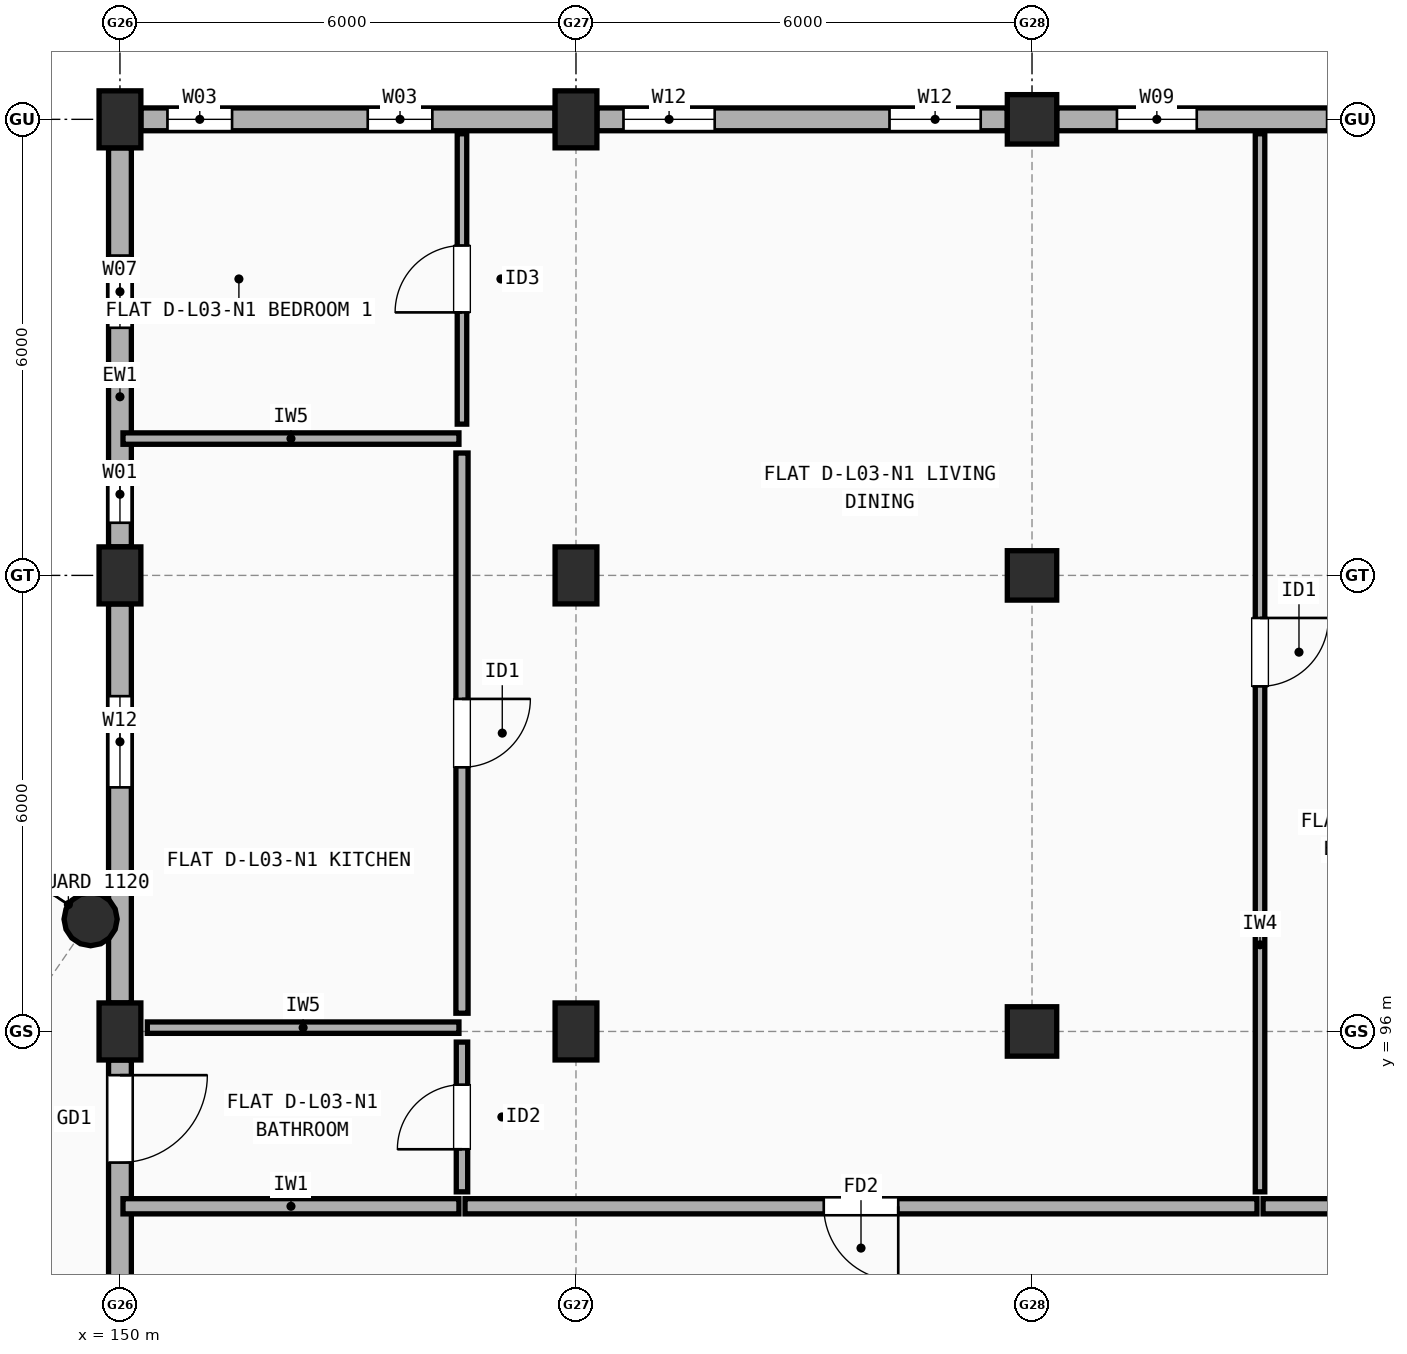
"""IFC4 building model, lengths in metres.
Left out: names, types, materials, properties, quantities, classifications, styles, units other than length and angle.
Written with IfcOpenShell. Run it as: python <this file> out.ifc"""

import sys

from ifc_helpers import new_model, si_unit, direction, frame, frame_2d, origin, origin_2d, place, context, subcontext, project, spatial, rectangle, circle, extrude, element, fill, save


model = new_model("IFC4")
c1 = context("Model", 3, precision=1e-05, world=origin(), true_north=direction((0.0, 1.0)))
c2 = subcontext(c1, "Body", "Model", "MODEL_VIEW")
j1 = project(units=[si_unit("LENGTHUNIT", "METRE"), si_unit("PLANEANGLEUNIT", "RADIAN")], contexts=[c1])
p1 = place(None, origin())
s1 = spatial("IfcSite", under=j1, at=p1, CompositionType="ELEMENT")
p2 = place(p1, origin())
s2 = spatial("IfcBuilding", under=s1, at=p2, CompositionType="ELEMENT")
p3 = place(p2, frame((0.0, 0.0, 10.9)))
s3 = spatial("IfcBuildingStorey", under=s2, at=p3, CompositionType="ELEMENT", Elevation=10.9)
for number, where, z_axis, x_axis in (
    (1, (150.0, 96.0, 0.0), (0.0, 0.0, 1.0), (1.0, 0.0, 0.0)),
    (2, (150.0, 102.0, 0.0), (0.0, 0.0, 1.0), (1.0, 0.0, 0.0)),
    (3, (150.0, 108.0, 0.0), (0.0, 0.0, 1.0), (1.0, 0.0, 0.0)),
    (4, (156.0, 96.0, 0.0), (0.0, 0.0, 1.0), (1.0, 0.0, 0.0)),
    (5, (156.0, 102.0, 0.0), (0.0, 0.0, 1.0), (1.0, 0.0, 0.0)),
    (6, (156.0, 108.0, 0.0), (0.0, 0.0, 1.0), (1.0, 0.0, 0.0)),
):
    element("IfcColumn", number, at=place(p3, frame(where, z_axis=z_axis, x_axis=x_axis)), inside=s3, PredefinedType="COLUMN", context=c2, shape_type="SweptSolid", body=[
        extrude(rectangle(XDim=0.55, YDim=0.75, at=origin_2d()), origin(), (0.0, 0.0, 1.0), 2.96),
    ])
for number, where, z_axis, x_axis in (
    (7, (162.0, 96.0, 0.0), (0.0, 0.0, 1.0), (1.0, 0.0, 0.0)),
    (8, (162.0, 102.0, 0.0), (0.0, 0.0, 1.0), (1.0, 0.0, 0.0)),
    (9, (162.0, 108.0, 0.0), (0.0, 0.0, 1.0), (1.0, 0.0, 0.0)),
):
    element("IfcColumn", number, at=place(p3, frame(where, z_axis=z_axis, x_axis=x_axis)), inside=s3, PredefinedType="COLUMN", context=c2, shape_type="SweptSolid", body=[
        extrude(rectangle(XDim=0.65, YDim=0.65, at=origin_2d()), origin(), (0.0, 0.0, 1.0), 2.96),
    ])
p4 = place(p3, frame((149.614, 97.477, 0.0), z_axis=(0.0, 0.0, 1.0), x_axis=(1.0, 0.0, 0.0)))
e10 = element("IfcColumn", 10, at=p4, inside=s3, PredefinedType="COLUMN", context=c2, shape_type="SweptSolid", body=[
    extrude(circle(Radius=0.35, at=origin_2d()), origin(), (0.0, 0.0, 1.0), 2.948),
])
p5 = place(p3, frame((167.675, 108.0, 0.0), z_axis=(0.0, 0.0, 1.0), x_axis=(-1.0, 0.0, 0.0)))
e11 = element("IfcWall", 11, at=p5, inside=s3, PredefinedType="STANDARD", context=c2, shape_type="SweptSolid", body=[
    extrude(rectangle(XDim=5.35, YDim=0.3, at=frame_2d((2.675, 0.0))), origin(), (0.0, 0.0, 1.0), 2.442),
])
p6 = place(p5, frame((0.843, 0.0, 0.9)))
e12 = element("IfcOpeningElement", 12, at=p6, cuts=e11, PredefinedType="OPENING", context=c2, shape_type="SweptSolid", body=[
    extrude(rectangle(XDim=0.95, YDim=1.35, at=frame_2d((0.475, 0.675))), frame((0.0, 0.16, 0.0), z_axis=(0.0, -1.0, 0.0), x_axis=(1.0, 0.0, 0.0)), (0.0, 0.0, 1.0), 0.32),
])
p7 = place(p5, frame((3.508, 0.0, 0.9)))
e13 = element("IfcOpeningElement", 13, at=p7, cuts=e11, PredefinedType="OPENING", context=c2, shape_type="SweptSolid", body=[
    extrude(rectangle(XDim=1.05, YDim=1.35, at=frame_2d((0.525, 0.675))), frame((0.0, 0.16, 0.0), z_axis=(0.0, -1.0, 0.0), x_axis=(1.0, 0.0, 0.0)), (0.0, 0.0, 1.0), 0.32),
])
p8 = place(p3, frame((161.675, 108.0, 0.0), z_axis=(0.0, 0.0, 1.0), x_axis=(-1.0, 0.0, 0.0)))
e14 = element("IfcWall", 14, at=p8, inside=s3, PredefinedType="STANDARD", context=c2, shape_type="SweptSolid", body=[
    extrude(rectangle(XDim=5.4, YDim=0.3, at=frame_2d((2.7, 0.0))), origin(), (0.0, 0.0, 1.0), 2.442),
])
p9 = place(p8, frame((0.35, 0.0, 0.9)))
e15 = element("IfcOpeningElement", 15, at=p9, cuts=e14, PredefinedType="OPENING", context=c2, shape_type="SweptSolid", body=[
    extrude(rectangle(XDim=1.2, YDim=1.35, at=frame_2d((0.6, 0.675))), frame((0.0, 0.16, 0.0), z_axis=(0.0, -1.0, 0.0), x_axis=(1.0, 0.0, 0.0)), (0.0, 0.0, 1.0), 0.32),
])
p10 = place(p8, frame((3.85, 0.0, 0.9)))
e16 = element("IfcOpeningElement", 16, at=p10, cuts=e14, PredefinedType="OPENING", context=c2, shape_type="SweptSolid", body=[
    extrude(rectangle(XDim=1.2, YDim=1.35, at=frame_2d((0.6, 0.675))), frame((0.0, 0.16, 0.0), z_axis=(0.0, -1.0, 0.0), x_axis=(1.0, 0.0, 0.0)), (0.0, 0.0, 1.0), 0.32),
])
p11 = place(p3, frame((155.725, 108.0, 0.0), z_axis=(0.0, 0.0, 1.0), x_axis=(-1.0, 0.0, 0.0)))
e17 = element("IfcWall", 17, at=p11, inside=s3, PredefinedType="STANDARD", context=c2, shape_type="SweptSolid", body=[
    extrude(rectangle(XDim=5.45, YDim=0.3, at=frame_2d((2.725, 0.0))), origin(), (0.0, 0.0, 1.0), 2.442),
])
p12 = place(p11, frame((1.615, 0.0, 0.9)))
e18 = element("IfcOpeningElement", 18, at=p12, cuts=e17, PredefinedType="OPENING", context=c2, shape_type="SweptSolid", body=[
    extrude(rectangle(XDim=0.85, YDim=1.25, at=frame_2d((0.425, 0.625))), frame((0.0, 0.16, 0.0), z_axis=(0.0, -1.0, 0.0), x_axis=(1.0, 0.0, 0.0)), (0.0, 0.0, 1.0), 0.32),
])
p13 = place(p11, frame((4.25, 0.0, 0.9)))
e19 = element("IfcOpeningElement", 19, at=p13, cuts=e17, PredefinedType="OPENING", context=c2, shape_type="SweptSolid", body=[
    extrude(rectangle(XDim=0.85, YDim=1.25, at=frame_2d((0.425, 0.625))), frame((0.0, 0.16, 0.0), z_axis=(0.0, -1.0, 0.0), x_axis=(1.0, 0.0, 0.0)), (0.0, 0.0, 1.0), 0.32),
])
p14 = place(p3, frame((150.0, 107.625, 0.0), z_axis=(0.0, 0.0, 1.0), x_axis=(0.0, -1.0, 0.0)))
e20 = element("IfcWall", 20, at=p14, inside=s3, PredefinedType="STANDARD", context=c2, shape_type="SweptSolid", body=[
    extrude(rectangle(XDim=5.25, YDim=0.3, at=frame_2d((2.625, 0.0))), origin(), (0.0, 0.0, 1.0), 2.442),
])
p15 = place(p14, frame((1.417, 0.0, 0.9)))
e21 = element("IfcOpeningElement", 21, at=p15, cuts=e20, PredefinedType="OPENING", context=c2, shape_type="SweptSolid", body=[
    extrude(rectangle(XDim=0.95, YDim=1.35, at=frame_2d((0.475, 0.675))), frame((0.0, 0.16, 0.0), z_axis=(0.0, -1.0, 0.0), x_axis=(1.0, 0.0, 0.0)), (0.0, 0.0, 1.0), 0.32),
])
p16 = place(p14, frame((4.183, 0.0, 0.9)))
e22 = element("IfcOpeningElement", 22, at=p16, cuts=e20, PredefinedType="OPENING", context=c2, shape_type="SweptSolid", body=[
    extrude(rectangle(XDim=0.75, YDim=1.15, at=frame_2d((0.375, 0.575))), frame((0.0, 0.16, 0.0), z_axis=(0.0, -1.0, 0.0), x_axis=(1.0, 0.0, 0.0)), (0.0, 0.0, 1.0), 0.32),
])
p17 = place(p3, frame((150.0, 101.625, 0.0), z_axis=(0.0, 0.0, 1.0), x_axis=(0.0, -1.0, 0.0)))
e23 = element("IfcWall", 23, at=p17, inside=s3, PredefinedType="STANDARD", context=c2, shape_type="SweptSolid", body=[
    extrude(rectangle(XDim=5.25, YDim=0.3, at=frame_2d((2.625, 0.0))), origin(), (0.0, 0.0, 1.0), 2.442),
])
p18 = place(p17, frame((1.214, 0.0, 0.9)))
e24 = element("IfcOpeningElement", 24, at=p18, cuts=e23, PredefinedType="OPENING", context=c2, shape_type="SweptSolid", body=[
    extrude(rectangle(XDim=1.2, YDim=1.35, at=frame_2d((0.6, 0.675))), frame((0.0, 0.16, 0.0), z_axis=(0.0, -1.0, 0.0), x_axis=(1.0, 0.0, 0.0)), (0.0, 0.0, 1.0), 0.32),
])
p19 = place(p3, frame((150.0, 95.625, 0.0), z_axis=(0.0, 0.0, 1.0), x_axis=(0.0, -1.0, 0.0)))
e25 = element("IfcWall", 25, at=p19, inside=s3, PredefinedType="STANDARD", context=c2, shape_type="SweptSolid", body=[
    extrude(rectangle(XDim=5.25, YDim=0.3, at=frame_2d((2.625, 0.0))), origin(), (0.0, 0.0, 1.0), 2.442),
])
p20 = place(p19, frame((0.2, 0.0, 0.0)))
e26 = element("IfcOpeningElement", 26, at=p20, cuts=e25, PredefinedType="OPENING", context=c2, shape_type="SweptSolid", body=[
    extrude(rectangle(XDim=1.15, YDim=2.15, at=frame_2d((0.575, 1.075))), frame((0.0, 0.16, 0.0), z_axis=(0.0, -1.0, 0.0), x_axis=(1.0, 0.0, 0.0)), (0.0, 0.0, 1.0), 0.32),
])
p21 = place(p19, frame((3.208, 0.0, 0.9)))
e27 = element("IfcOpeningElement", 27, at=p21, cuts=e25, PredefinedType="OPENING", context=c2, shape_type="SweptSolid", body=[
    extrude(rectangle(XDim=0.8, YDim=1.2, at=frame_2d((0.4, 0.6))), frame((0.0, 0.16, 0.0), z_axis=(0.0, -1.0, 0.0), x_axis=(1.0, 0.0, 0.0)), (0.0, 0.0, 1.0), 0.32),
])
p22 = place(p3, frame((150.04, 93.7, 0.0), z_axis=(0.0, 0.0, 1.0), x_axis=(1.0, 0.0, 0.0)))
e28 = element("IfcWall", 28, at=p22, inside=s3, PredefinedType="SOLIDWALL", context=c2, shape_type="SweptSolid", body=[
    extrude(rectangle(XDim=4.42, YDim=0.2, at=frame_2d((2.21, 0.0))), origin(), (0.0, 0.0, 1.0), 2.442),
])
p23 = place(p3, frame((154.54, 93.7, 0.0), z_axis=(0.0, 0.0, 1.0), x_axis=(1.0, 0.0, 0.0)))
e29 = element("IfcWall", 29, at=p23, inside=s3, PredefinedType="SOLIDWALL", context=c2, shape_type="SweptSolid", body=[
    extrude(rectangle(XDim=10.42, YDim=0.2, at=frame_2d((5.21, 0.0))), origin(), (0.0, 0.0, 1.0), 2.442),
])
p24 = place(p23, frame((4.72, 0.0, 0.0)))
e30 = element("IfcOpeningElement", 30, at=p24, cuts=e29, PredefinedType="OPENING", context=c2, shape_type="SweptSolid", body=[
    extrude(rectangle(XDim=0.98, YDim=2.15, at=frame_2d((0.49, 1.075))), frame((0.0, 0.11, 0.0), z_axis=(0.0, -1.0, 0.0), x_axis=(1.0, 0.0, 0.0)), (0.0, 0.0, 1.0), 0.22),
])
p25 = place(p3, frame((154.5, 103.99, 0.0), z_axis=(0.0, 0.0, 1.0), x_axis=(0.0, 1.0, 0.0)))
e31 = element("IfcWall", 31, at=p25, inside=s3, PredefinedType="PARTITIONING", context=c2, shape_type="SweptSolid", body=[
    extrude(rectangle(XDim=3.82, YDim=0.125, at=frame_2d((1.91, 0.0))), origin(), (0.0, 0.0, 1.0), 2.96),
])
p26 = place(p25, frame((1.47, 0.0, 0.0)))
e32 = element("IfcOpeningElement", 32, at=p26, cuts=e31, PredefinedType="OPENING", context=c2, shape_type="SweptSolid", body=[
    extrude(rectangle(XDim=0.88, YDim=2.1, at=frame_2d((0.44, 1.05))), frame((0.0, 0.073, 0.0), z_axis=(0.0, -1.0, 0.0), x_axis=(1.0, 0.0, 0.0)), (0.0, 0.0, 1.0), 0.145),
])
p27 = place(p3, frame((154.5, 96.24, 0.0), z_axis=(0.0, 0.0, 1.0), x_axis=(0.0, 1.0, 0.0)))
e33 = element("IfcWall", 33, at=p27, inside=s3, PredefinedType="PLUMBINGWALL", context=c2, shape_type="SweptSolid", body=[
    extrude(rectangle(XDim=7.37, YDim=0.16, at=frame_2d((3.685, 0.0))), origin(), (0.0, 0.0, 1.0), 2.442),
])
p28 = place(p27, frame((3.235, 0.0, 0.0)))
e34 = element("IfcOpeningElement", 34, at=p28, cuts=e33, PredefinedType="OPENING", context=c2, shape_type="SweptSolid", body=[
    extrude(rectangle(XDim=0.9, YDim=2.1, at=frame_2d((0.45, 1.05))), frame((0.0, 0.09, 0.0), z_axis=(0.0, -1.0, 0.0), x_axis=(1.0, 0.0, 0.0)), (0.0, 0.0, 1.0), 0.18),
])
p29 = place(p3, frame((154.5, 93.89, 0.0), z_axis=(0.0, 0.0, 1.0), x_axis=(0.0, 1.0, 0.0)))
e35 = element("IfcWall", 35, at=p29, inside=s3, PredefinedType="PARTITIONING", context=c2, shape_type="SweptSolid", body=[
    extrude(rectangle(XDim=1.97, YDim=0.15, at=frame_2d((0.985, 0.0))), origin(), (0.0, 0.0, 1.0), 2.96),
])
p30 = place(p29, frame((0.56, 0.0, 0.0)))
e36 = element("IfcOpeningElement", 36, at=p30, cuts=e35, PredefinedType="OPENING", context=c2, shape_type="SweptSolid", body=[
    extrude(rectangle(XDim=0.85, YDim=2.1, at=frame_2d((0.425, 1.05))), frame((0.0, 0.085, 0.0), z_axis=(0.0, -1.0, 0.0), x_axis=(1.0, 0.0, 0.0)), (0.0, 0.0, 1.0), 0.17),
])
p31 = place(p3, frame((150.04, 103.8, 0.0), z_axis=(0.0, 0.0, 1.0), x_axis=(1.0, 0.0, 0.0)))
e37 = element("IfcWall", 37, at=p31, inside=s3, PredefinedType="PARTITIONING", context=c2, shape_type="SweptSolid", body=[
    extrude(rectangle(XDim=4.42, YDim=0.15, at=frame_2d((2.21, 0.0))), origin(), (0.0, 0.0, 1.0), 2.442),
])
p32 = place(p3, frame((150.36, 96.05, 0.0), z_axis=(0.0, 0.0, 1.0), x_axis=(1.0, 0.0, 0.0)))
e38 = element("IfcWall", 38, at=p32, inside=s3, PredefinedType="PARTITIONING", context=c2, shape_type="SweptSolid", body=[
    extrude(rectangle(XDim=4.1, YDim=0.15, at=frame_2d((2.05, 0.0))), origin(), (0.0, 0.0, 1.0), 2.548),
])
p33 = place(p3, frame((165.04, 93.7, 0.0), z_axis=(0.0, 0.0, 1.0), x_axis=(1.0, 0.0, 0.0)))
e39 = element("IfcWall", 39, at=p33, inside=s3, PredefinedType="SOLIDWALL", context=c2, shape_type="SweptSolid", body=[
    extrude(rectangle(XDim=2.92, YDim=0.2, at=frame_2d((1.46, 0.0))), origin(), (0.0, 0.0, 1.0), 2.508),
])
p34 = place(p3, frame((165.0, 93.89, 0.0), z_axis=(0.0, 0.0, 1.0), x_axis=(0.0, 1.0, 0.0)))
e40 = element("IfcWall", 40, at=p34, inside=s3, PredefinedType="PARTITIONING", context=c2, shape_type="SweptSolid", body=[
    extrude(rectangle(XDim=13.92, YDim=0.125, at=frame_2d((6.96, 0.0))), origin(), (0.0, 0.0, 1.0), 2.408),
])
p35 = place(p34, frame((6.65, 0.0, 0.0)))
e41 = element("IfcOpeningElement", 41, at=p35, cuts=e40, PredefinedType="OPENING", context=c2, shape_type="SweptSolid", body=[
    extrude(rectangle(XDim=0.9, YDim=2.1, at=frame_2d((0.45, 1.05))), frame((0.0, 0.073, 0.0), z_axis=(0.0, -1.0, 0.0), x_axis=(1.0, 0.0, 0.0)), (0.0, 0.0, 1.0), 0.145),
])
p36 = place(p6, origin())
e42 = element("IfcWindow", 42, at=p36, inside=s3, PartitioningType="SINGLE_PANEL", PredefinedType="WINDOW", context=c2, shape_type="SweptSolid", body=[
    extrude(rectangle(XDim=0.95, YDim=1.35, at=frame_2d((0.475, 0.675))), frame((0.0, 0.03, 0.0), z_axis=(0.0, -1.0, 0.0), x_axis=(1.0, 0.0, 0.0)), (0.0, 0.0, 1.0), 0.06),
])
fill(e12, e42)
p37 = place(p7, origin())
e43 = element("IfcWindow", 43, at=p37, inside=s3, PartitioningType="SINGLE_PANEL", PredefinedType="WINDOW", context=c2, shape_type="SweptSolid", body=[
    extrude(rectangle(XDim=1.05, YDim=1.35, at=frame_2d((0.525, 0.675))), frame((0.0, 0.03, 0.0), z_axis=(0.0, -1.0, 0.0), x_axis=(1.0, 0.0, 0.0)), (0.0, 0.0, 1.0), 0.06),
])
fill(e13, e43)
p38 = place(p9, origin())
e44 = element("IfcWindow", 44, at=p38, inside=s3, PartitioningType="SINGLE_PANEL", PredefinedType="WINDOW", context=c2, shape_type="SweptSolid", body=[
    extrude(rectangle(XDim=1.2, YDim=1.35, at=frame_2d((0.6, 0.675))), frame((0.0, 0.03, 0.0), z_axis=(0.0, -1.0, 0.0), x_axis=(1.0, 0.0, 0.0)), (0.0, 0.0, 1.0), 0.06),
])
fill(e15, e44)
p39 = place(p10, origin())
e45 = element("IfcWindow", 45, at=p39, inside=s3, PartitioningType="SINGLE_PANEL", PredefinedType="WINDOW", context=c2, shape_type="SweptSolid", body=[
    extrude(rectangle(XDim=1.2, YDim=1.35, at=frame_2d((0.6, 0.675))), frame((0.0, 0.03, 0.0), z_axis=(0.0, -1.0, 0.0), x_axis=(1.0, 0.0, 0.0)), (0.0, 0.0, 1.0), 0.06),
])
fill(e16, e45)
p40 = place(p12, origin())
e46 = element("IfcWindow", 46, at=p40, inside=s3, PartitioningType="SINGLE_PANEL", PredefinedType="WINDOW", context=c2, shape_type="SweptSolid", body=[
    extrude(rectangle(XDim=0.85, YDim=1.25, at=frame_2d((0.425, 0.625))), frame((0.0, 0.03, 0.0), z_axis=(0.0, -1.0, 0.0), x_axis=(1.0, 0.0, 0.0)), (0.0, 0.0, 1.0), 0.06),
])
fill(e18, e46)
p41 = place(p13, origin())
e47 = element("IfcWindow", 47, at=p41, inside=s3, PartitioningType="SINGLE_PANEL", PredefinedType="WINDOW", context=c2, shape_type="SweptSolid", body=[
    extrude(rectangle(XDim=0.85, YDim=1.25, at=frame_2d((0.425, 0.625))), frame((0.0, 0.03, 0.0), z_axis=(0.0, -1.0, 0.0), x_axis=(1.0, 0.0, 0.0)), (0.0, 0.0, 1.0), 0.06),
])
fill(e19, e47)
p42 = place(p15, origin())
e48 = element("IfcWindow", 48, at=p42, inside=s3, PartitioningType="SINGLE_PANEL", PredefinedType="WINDOW", context=c2, shape_type="SweptSolid", body=[
    extrude(rectangle(XDim=0.95, YDim=1.35, at=frame_2d((0.475, 0.675))), frame((0.0, 0.03, 0.0), z_axis=(0.0, -1.0, 0.0), x_axis=(1.0, 0.0, 0.0)), (0.0, 0.0, 1.0), 0.06),
])
fill(e21, e48)
p43 = place(p16, origin())
e49 = element("IfcWindow", 49, at=p43, inside=s3, PartitioningType="SINGLE_PANEL", PredefinedType="WINDOW", context=c2, shape_type="SweptSolid", body=[
    extrude(rectangle(XDim=0.75, YDim=1.15, at=frame_2d((0.375, 0.575))), frame((0.0, 0.03, 0.0), z_axis=(0.0, -1.0, 0.0), x_axis=(1.0, 0.0, 0.0)), (0.0, 0.0, 1.0), 0.06),
])
fill(e22, e49)
p44 = place(p18, origin())
e50 = element("IfcWindow", 50, at=p44, inside=s3, PartitioningType="SINGLE_PANEL", PredefinedType="WINDOW", context=c2, shape_type="SweptSolid", body=[
    extrude(rectangle(XDim=1.2, YDim=1.35, at=frame_2d((0.6, 0.675))), frame((0.0, 0.03, 0.0), z_axis=(0.0, -1.0, 0.0), x_axis=(1.0, 0.0, 0.0)), (0.0, 0.0, 1.0), 0.06),
])
fill(e24, e50)
p45 = place(p20, frame((1.15, 0.0, 0.0), z_axis=(0.0, 0.0, 1.0), x_axis=(-1.0, 0.0, 0.0)))
e51 = element("IfcDoor", 51, at=p45, inside=s3, OperationType="SINGLE_SWING_LEFT", PredefinedType="DOOR", context=c2, shape_type="SweptSolid", body=[
    extrude(rectangle(XDim=1.15, YDim=2.15, at=frame_2d((0.575, 1.075))), frame((0.0, 0.025, 0.0), z_axis=(0.0, -1.0, 0.0), x_axis=(1.0, 0.0, 0.0)), (0.0, 0.0, 1.0), 0.05),
])
fill(e26, e51)
p46 = place(p24, origin())
e52 = element("IfcDoor", 52, at=p46, inside=s3, OperationType="SINGLE_SWING_RIGHT", PredefinedType="DOOR", context=c2, shape_type="SweptSolid", body=[
    extrude(rectangle(XDim=0.98, YDim=2.15, at=frame_2d((0.49, 1.075))), frame((0.0, 0.025, 0.0), z_axis=(0.0, -1.0, 0.0), x_axis=(1.0, 0.0, 0.0)), (0.0, 0.0, 1.0), 0.05),
])
fill(e30, e52)
p47 = place(p26, origin())
e53 = element("IfcDoor", 53, at=p47, inside=s3, OperationType="SINGLE_SWING_LEFT", PredefinedType="DOOR", context=c2, shape_type="SweptSolid", body=[
    extrude(rectangle(XDim=0.88, YDim=2.1, at=frame_2d((0.44, 1.05))), frame((0.0, 0.025, 0.0), z_axis=(0.0, -1.0, 0.0), x_axis=(1.0, 0.0, 0.0)), (0.0, 0.0, 1.0), 0.05),
])
fill(e32, e53)
p48 = place(p28, origin())
e54 = element("IfcDoor", 54, at=p48, inside=s3, OperationType="SINGLE_SWING_RIGHT", PredefinedType="DOOR", context=c2, shape_type="SweptSolid", body=[
    extrude(rectangle(XDim=0.9, YDim=2.1, at=frame_2d((0.45, 1.05))), frame((0.0, 0.025, 0.0), z_axis=(0.0, -1.0, 0.0), x_axis=(1.0, 0.0, 0.0)), (0.0, 0.0, 1.0), 0.05),
])
fill(e34, e54)
p49 = place(p30, origin())
e55 = element("IfcDoor", 55, at=p49, inside=s3, OperationType="SINGLE_SWING_LEFT", PredefinedType="DOOR", context=c2, shape_type="SweptSolid", body=[
    extrude(rectangle(XDim=0.85, YDim=2.1, at=frame_2d((0.425, 1.05))), frame((0.0, 0.025, 0.0), z_axis=(0.0, -1.0, 0.0), x_axis=(1.0, 0.0, 0.0)), (0.0, 0.0, 1.0), 0.05),
])
fill(e36, e55)
p50 = place(p35, origin())
e56 = element("IfcDoor", 56, at=p50, inside=s3, OperationType="SINGLE_SWING_RIGHT", PredefinedType="DOOR", context=c2, shape_type="SweptSolid", body=[
    extrude(rectangle(XDim=0.9, YDim=2.1, at=frame_2d((0.45, 1.05))), frame((0.0, 0.025, 0.0), z_axis=(0.0, -1.0, 0.0), x_axis=(1.0, 0.0, 0.0)), (0.0, 0.0, 1.0), 0.05),
])
fill(e41, e56)
save(model, sys.argv[1])
